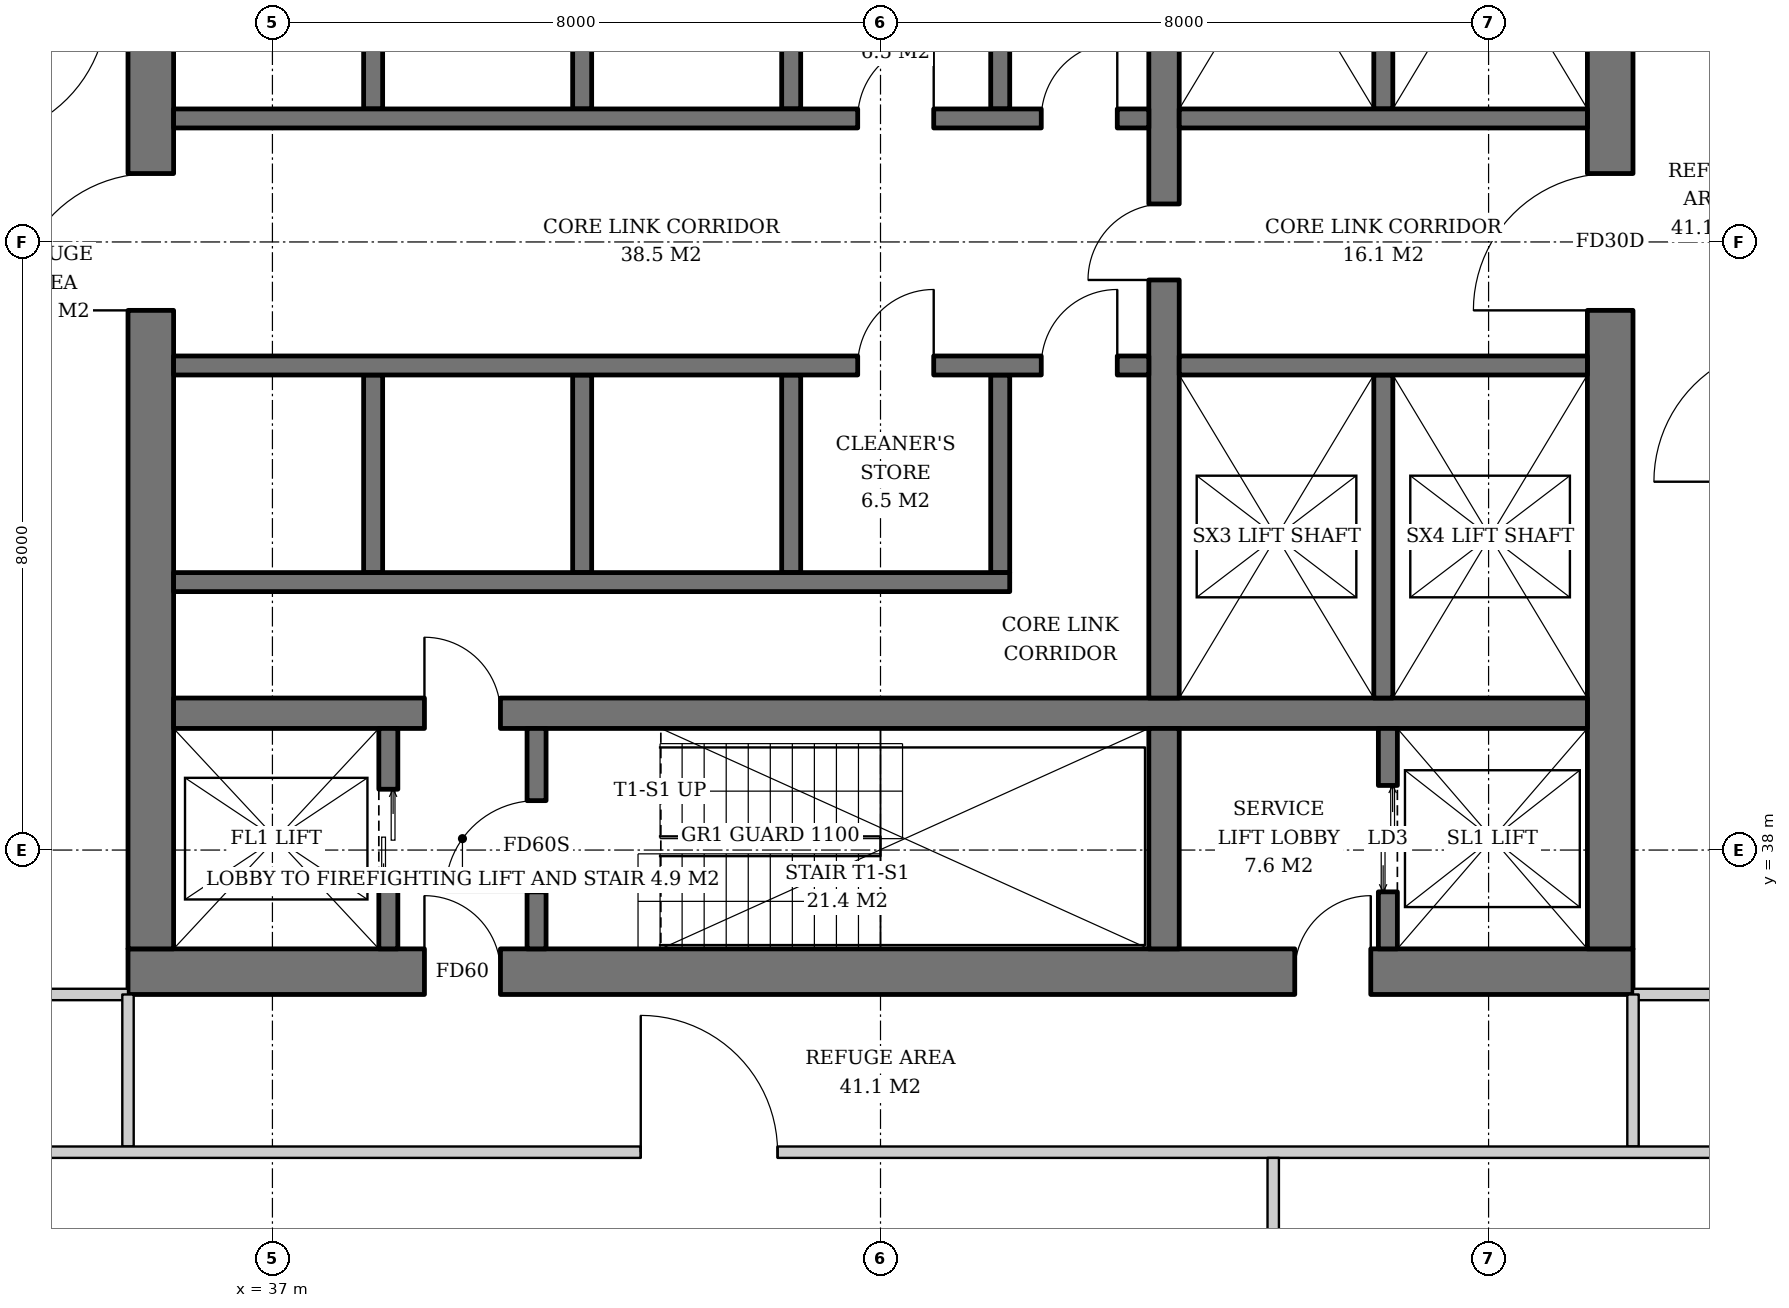
"""IFC4 building model, lengths in metres.
Left out: names, types, materials, properties, quantities, classifications, styles, units other than length and angle.
Written with IfcOpenShell. Run it as: python <this file> out.ifc"""

import sys

from ifc_helpers import new_model, si_unit, direction, frame, frame_2d, origin, place, context, subcontext, project, spatial, rectangle, extrude, element, fill, save


model = new_model("IFC4")
c1 = context("Model", 3, precision=1e-05, world=origin(), true_north=direction((0.0, 1.0)))
c2 = subcontext(c1, "Body", "Model", "MODEL_VIEW")
j1 = project(units=[si_unit("LENGTHUNIT", "METRE"), si_unit("PLANEANGLEUNIT", "RADIAN")], contexts=[c1])
p1 = place(None, origin())
s1 = spatial("IfcSite", under=j1, at=p1, CompositionType="ELEMENT")
p2 = place(p1, origin())
s2 = spatial("IfcBuilding", under=s1, at=p2, CompositionType="ELEMENT")
p3 = place(p2, frame((0.0, 0.0, 230.0)))
s3 = spatial("IfcBuildingStorey", under=s2, at=p3, CompositionType="ELEMENT", Elevation=230.0)
p4 = place(p3, frame((35.1, 36.4, 0.0), z_axis=(0.0, 0.0, 1.0), x_axis=(1.0, 0.0, 0.0)))
e1 = element("IfcWall", 1, at=p4, inside=s3, PredefinedType="SHEAR", context=c2, shape_type="SweptSolid", body=[
    extrude(rectangle(XDim=19.8, YDim=0.6, at=frame_2d((9.9, 0.0))), origin(), (0.0, 0.0, 1.0), 3.8),
])
p5 = place(p4, frame((3.9, 0.0, 0.0)))
e2 = element("IfcOpeningElement", 2, at=p5, cuts=e1, PredefinedType="OPENING", context=c2, shape_type="SweptSolid", body=[
    extrude(rectangle(XDim=1.0, YDim=2.1, at=frame_2d((0.5, 1.05))), frame((0.0, 0.31, 0.0), z_axis=(0.0, -1.0, 0.0), x_axis=(1.0, 0.0, 0.0)), (0.0, 0.0, 1.0), 0.62),
])
p6 = place(p4, frame((15.35, 0.0, 0.0)))
e3 = element("IfcOpeningElement", 3, at=p6, cuts=e1, PredefinedType="OPENING", context=c2, shape_type="SweptSolid", body=[
    extrude(rectangle(XDim=1.0, YDim=2.1, at=frame_2d((0.5, 1.05))), frame((0.0, 0.31, 0.0), z_axis=(0.0, -1.0, 0.0), x_axis=(1.0, 0.0, 0.0)), (0.0, 0.0, 1.0), 0.62),
])
p7 = place(p3, frame((35.4, 36.7, 0.0), z_axis=(0.0, 0.0, 1.0), x_axis=(0.0, 1.0, 0.0)))
e4 = element("IfcWall", 4, at=p7, inside=s3, PredefinedType="SHEAR", context=c2, shape_type="SweptSolid", body=[
    extrude(rectangle(XDim=18.6, YDim=0.6, at=frame_2d((9.3, 0.0))), origin(), (0.0, 0.0, 1.0), 3.8),
])
p8 = place(p7, frame((8.4, 0.0, 0.0)))
e5 = element("IfcOpeningElement", 5, at=p8, cuts=e4, PredefinedType="OPENING", context=c2, shape_type="SweptSolid", body=[
    extrude(rectangle(XDim=1.8, YDim=2.4, at=frame_2d((0.9, 1.2))), frame((0.0, 0.31, 0.0), z_axis=(0.0, -1.0, 0.0), x_axis=(1.0, 0.0, 0.0)), (0.0, 0.0, 1.0), 0.62),
])
p9 = place(p3, frame((54.6, 36.7, 0.0), z_axis=(0.0, 0.0, 1.0), x_axis=(0.0, 1.0, 0.0)))
e6 = element("IfcWall", 6, at=p9, inside=s3, PredefinedType="SHEAR", context=c2, shape_type="SweptSolid", body=[
    extrude(rectangle(XDim=18.6, YDim=0.6, at=frame_2d((9.3, 0.0))), origin(), (0.0, 0.0, 1.0), 3.8),
])
p10 = place(p9, frame((8.4, 0.0, 0.0)))
e7 = element("IfcOpeningElement", 7, at=p10, cuts=e6, PredefinedType="OPENING", context=c2, shape_type="SweptSolid", body=[
    extrude(rectangle(XDim=1.8, YDim=2.4, at=frame_2d((0.9, 1.2))), frame((0.0, 0.31, 0.0), z_axis=(0.0, -1.0, 0.0), x_axis=(1.0, 0.0, 0.0)), (0.0, 0.0, 1.0), 0.62),
])
p11 = place(p3, frame((35.7, 39.8, 0.0), z_axis=(0.0, 0.0, 1.0), x_axis=(1.0, 0.0, 0.0)))
e8 = element("IfcWall", 8, at=p11, inside=s3, PredefinedType="SHEAR", context=c2, shape_type="SweptSolid", body=[
    extrude(rectangle(XDim=18.6, YDim=0.4, at=frame_2d((9.3, 0.0))), origin(), (0.0, 0.0, 1.0), 3.8),
])
p12 = place(p11, frame((3.3, 0.0, 0.0)))
e9 = element("IfcOpeningElement", 9, at=p12, cuts=e8, PredefinedType="OPENING", context=c2, shape_type="SweptSolid", body=[
    extrude(rectangle(XDim=1.0, YDim=2.1, at=frame_2d((0.5, 1.05))), frame((0.0, 0.21, 0.0), z_axis=(0.0, -1.0, 0.0), x_axis=(1.0, 0.0, 0.0)), (0.0, 0.0, 1.0), 0.42),
])
p13 = place(p3, frame((48.73, 36.7, 0.0), z_axis=(0.0, 0.0, 1.0), x_axis=(0.0, 1.0, 0.0)))
e10 = element("IfcWall", 10, at=p13, inside=s3, PredefinedType="SHEAR", context=c2, shape_type="SweptSolid", body=[
    extrude(rectangle(XDim=2.9, YDim=0.4, at=frame_2d((1.45, 0.0))), origin(), (0.0, 0.0, 1.0), 3.8),
])
p14 = place(p3, frame((48.73, 40.0, 0.0), z_axis=(0.0, 0.0, 1.0), x_axis=(0.0, 1.0, 0.0)))
e11 = element("IfcWall", 11, at=p14, inside=s3, PredefinedType="SHEAR", context=c2, shape_type="SweptSolid", body=[
    extrude(rectangle(XDim=12.0, YDim=0.4, at=frame_2d((6.0, 0.0))), origin(), (0.0, 0.0, 1.0), 3.8),
])
p15 = place(p14, frame((5.5, 0.0, 0.0)))
e12 = element("IfcOpeningElement", 12, at=p15, cuts=e11, PredefinedType="OPENING", context=c2, shape_type="SweptSolid", body=[
    extrude(rectangle(XDim=1.0, YDim=2.1, at=frame_2d((0.5, 1.05))), frame((0.0, 0.21, 0.0), z_axis=(0.0, -1.0, 0.0), x_axis=(1.0, 0.0, 0.0)), (0.0, 0.0, 1.0), 0.42),
])
p16 = place(p3, frame((38.525, 36.7, 0.0), z_axis=(0.0, 0.0, 1.0), x_axis=(0.0, 1.0, 0.0)))
e13 = element("IfcWall", 13, at=p16, inside=s3, PredefinedType="SHEAR", context=c2, shape_type="SweptSolid", body=[
    extrude(rectangle(XDim=2.9, YDim=0.25, at=frame_2d((1.45, 0.0))), origin(), (0.0, 0.0, 1.0), 3.8),
])
p17 = place(p16, frame((0.8, 0.0, 0.0)))
e14 = element("IfcOpeningElement", 14, at=p17, cuts=e13, PredefinedType="OPENING", context=c2, shape_type="SweptSolid", body=[
    extrude(rectangle(XDim=1.3, YDim=2.2, at=frame_2d((0.65, 1.1))), frame((0.0, 0.135, 0.0), z_axis=(0.0, -1.0, 0.0), x_axis=(1.0, 0.0, 0.0)), (0.0, 0.0, 1.0), 0.27),
])
p18 = place(p3, frame((40.475, 36.7, 0.0), z_axis=(0.0, 0.0, 1.0), x_axis=(0.0, 1.0, 0.0)))
e15 = element("IfcWall", 15, at=p18, inside=s3, PredefinedType="SHEAR", context=c2, shape_type="SweptSolid", body=[
    extrude(rectangle(XDim=2.9, YDim=0.25, at=frame_2d((1.45, 0.0))), origin(), (0.0, 0.0, 1.0), 3.8),
])
p19 = place(p18, frame((0.75, 0.0, 0.0)))
e16 = element("IfcOpeningElement", 16, at=p19, cuts=e15, PredefinedType="OPENING", context=c2, shape_type="SweptSolid", body=[
    extrude(rectangle(XDim=1.2, YDim=2.1, at=frame_2d((0.6, 1.05))), frame((0.0, 0.135, 0.0), z_axis=(0.0, -1.0, 0.0), x_axis=(1.0, 0.0, 0.0)), (0.0, 0.0, 1.0), 0.27),
])
p20 = place(p3, frame((51.675, 36.7, 0.0), z_axis=(0.0, 0.0, 1.0), x_axis=(0.0, 1.0, 0.0)))
e17 = element("IfcWall", 17, at=p20, inside=s3, PredefinedType="SHEAR", context=c2, shape_type="SweptSolid", body=[
    extrude(rectangle(XDim=2.9, YDim=0.25, at=frame_2d((1.45, 0.0))), origin(), (0.0, 0.0, 1.0), 3.8),
])
p21 = place(p20, frame((0.75, 0.0, 0.0)))
e18 = element("IfcOpeningElement", 18, at=p21, cuts=e17, PredefinedType="OPENING", context=c2, shape_type="SweptSolid", body=[
    extrude(rectangle(XDim=1.4, YDim=2.4, at=frame_2d((0.7, 1.2))), frame((0.0, 0.135, 0.0), z_axis=(0.0, -1.0, 0.0), x_axis=(1.0, 0.0, 0.0)), (0.0, 0.0, 1.0), 0.27),
])
for number, where, z_axis, x_axis in (
    (19, (38.325, 47.75, 0.0), (0.0, 0.0, 1.0), (0.0, 1.0, 0.0)),
    (20, (41.075, 47.75, 0.0), (0.0, 0.0, 1.0), (0.0, 1.0, 0.0)),
    (21, (43.825, 47.75, 0.0), (0.0, 0.0, 1.0), (0.0, 1.0, 0.0)),
    (22, (46.575, 47.75, 0.0), (0.0, 0.0, 1.0), (0.0, 1.0, 0.0)),
):
    element("IfcWall", number, at=place(p3, frame(where, z_axis=z_axis, x_axis=x_axis)), inside=s3, PredefinedType="SHEAR", context=c2, shape_type="SweptSolid", body=[
        extrude(rectangle(XDim=2.6, YDim=0.25, at=frame_2d((1.3, 0.0))), origin(), (0.0, 0.0, 1.0), 3.8),
    ])
p22 = place(p3, frame((35.7, 47.625, 0.0), z_axis=(0.0, 0.0, 1.0), x_axis=(1.0, 0.0, 0.0)))
e23 = element("IfcWall", 23, at=p22, inside=s3, PredefinedType="SHEAR", context=c2, shape_type="SweptSolid", body=[
    extrude(rectangle(XDim=12.83, YDim=0.25, at=frame_2d((6.415, 0.0))), origin(), (0.0, 0.0, 1.0), 3.8),
])
p23 = place(p22, frame((9.0, 0.0, 0.0)))
e24 = element("IfcOpeningElement", 24, at=p23, cuts=e23, PredefinedType="OPENING", context=c2, shape_type="SweptSolid", body=[
    extrude(rectangle(XDim=1.0, YDim=2.1, at=frame_2d((0.5, 1.05))), frame((0.0, 0.135, 0.0), z_axis=(0.0, -1.0, 0.0), x_axis=(1.0, 0.0, 0.0)), (0.0, 0.0, 1.0), 0.27),
])
p24 = place(p22, frame((11.415, 0.0, 0.0)))
e25 = element("IfcOpeningElement", 25, at=p24, cuts=e23, PredefinedType="OPENING", context=c2, shape_type="SweptSolid", body=[
    extrude(rectangle(XDim=1.0, YDim=2.1, at=frame_2d((0.5, 1.05))), frame((0.0, 0.135, 0.0), z_axis=(0.0, -1.0, 0.0), x_axis=(1.0, 0.0, 0.0)), (0.0, 0.0, 1.0), 0.27),
])
for number, where, z_axis, x_axis in (
    (26, (38.325, 44.25, 0.0), (0.0, 0.0, 1.0), (0.0, -1.0, 0.0)),
    (27, (41.075, 44.25, 0.0), (0.0, 0.0, 1.0), (0.0, -1.0, 0.0)),
    (28, (43.825, 44.25, 0.0), (0.0, 0.0, 1.0), (0.0, -1.0, 0.0)),
    (29, (46.575, 44.25, 0.0), (0.0, 0.0, 1.0), (0.0, -1.0, 0.0)),
):
    element("IfcWall", number, at=place(p3, frame(where, z_axis=z_axis, x_axis=x_axis)), inside=s3, PredefinedType="SHEAR", context=c2, shape_type="SweptSolid", body=[
        extrude(rectangle(XDim=2.6, YDim=0.25, at=frame_2d((1.3, 0.0))), origin(), (0.0, 0.0, 1.0), 3.8),
    ])
p25 = place(p3, frame((35.7, 41.525, 0.0), z_axis=(0.0, 0.0, 1.0), x_axis=(1.0, 0.0, 0.0)))
e30 = element("IfcWall", 30, at=p25, inside=s3, PredefinedType="SHEAR", context=c2, shape_type="SweptSolid", body=[
    extrude(rectangle(XDim=11.0, YDim=0.25, at=frame_2d((5.5, 0.0))), origin(), (0.0, 0.0, 1.0), 3.8),
])
p26 = place(p3, frame((35.7, 44.375, 0.0), z_axis=(0.0, 0.0, 1.0), x_axis=(1.0, 0.0, 0.0)))
e31 = element("IfcWall", 31, at=p26, inside=s3, PredefinedType="SHEAR", context=c2, shape_type="SweptSolid", body=[
    extrude(rectangle(XDim=12.83, YDim=0.25, at=frame_2d((6.415, 0.0))), origin(), (0.0, 0.0, 1.0), 3.8),
])
p27 = place(p26, frame((9.0, 0.0, 0.0)))
e32 = element("IfcOpeningElement", 32, at=p27, cuts=e31, PredefinedType="OPENING", context=c2, shape_type="SweptSolid", body=[
    extrude(rectangle(XDim=1.0, YDim=2.1, at=frame_2d((0.5, 1.05))), frame((0.0, 0.135, 0.0), z_axis=(0.0, -1.0, 0.0), x_axis=(1.0, 0.0, 0.0)), (0.0, 0.0, 1.0), 0.27),
])
p28 = place(p26, frame((11.415, 0.0, 0.0)))
e33 = element("IfcOpeningElement", 33, at=p28, cuts=e31, PredefinedType="OPENING", context=c2, shape_type="SweptSolid", body=[
    extrude(rectangle(XDim=1.0, YDim=2.1, at=frame_2d((0.5, 1.05))), frame((0.0, 0.135, 0.0), z_axis=(0.0, -1.0, 0.0), x_axis=(1.0, 0.0, 0.0)), (0.0, 0.0, 1.0), 0.27),
])
p29 = place(p3, frame((51.615, 47.75, 0.0), z_axis=(0.0, 0.0, 1.0), x_axis=(0.0, 1.0, 0.0)))
e34 = element("IfcWall", 34, at=p29, inside=s3, PredefinedType="SHEAR", context=c2, shape_type="SweptSolid", body=[
    extrude(rectangle(XDim=4.25, YDim=0.25, at=frame_2d((2.125, 0.0))), origin(), (0.0, 0.0, 1.0), 3.8),
])
p30 = place(p3, frame((48.93, 47.625, 0.0), z_axis=(0.0, 0.0, 1.0), x_axis=(1.0, 0.0, 0.0)))
e35 = element("IfcWall", 35, at=p30, inside=s3, PredefinedType="SHEAR", context=c2, shape_type="SweptSolid", body=[
    extrude(rectangle(XDim=5.37, YDim=0.25, at=frame_2d((2.685, 0.0))), origin(), (0.0, 0.0, 1.0), 3.8),
])
p31 = place(p3, frame((51.615, 44.25, 0.0), z_axis=(0.0, 0.0, 1.0), x_axis=(0.0, -1.0, 0.0)))
e36 = element("IfcWall", 36, at=p31, inside=s3, PredefinedType="SHEAR", context=c2, shape_type="SweptSolid", body=[
    extrude(rectangle(XDim=4.25, YDim=0.25, at=frame_2d((2.125, 0.0))), origin(), (0.0, 0.0, 1.0), 3.8),
])
p32 = place(p3, frame((48.93, 44.375, 0.0), z_axis=(0.0, 0.0, 1.0), x_axis=(1.0, 0.0, 0.0)))
e37 = element("IfcWall", 37, at=p32, inside=s3, PredefinedType="SHEAR", context=c2, shape_type="SweptSolid", body=[
    extrude(rectangle(XDim=5.37, YDim=0.25, at=frame_2d((2.685, 0.0))), origin(), (0.0, 0.0, 1.0), 3.8),
])
for number, where, z_axis, x_axis in (
    (38, (54.9, 36.1, 0.0), (0.0, 0.0, 1.0), (1.0, 0.0, 0.0)),
    (39, (35.1, 36.1, 0.0), (0.0, 0.0, 1.0), (-1.0, 0.0, 0.0)),
    (40, (54.9, 36.1, 0.0), (0.0, 0.0, 1.0), (0.0, -1.0, 0.0)),
    (41, (35.1, 36.1, 0.0), (0.0, 0.0, 1.0), (0.0, -1.0, 0.0)),
):
    element("IfcWall", number, at=place(p3, frame(where, z_axis=z_axis, x_axis=x_axis)), inside=s3, PredefinedType="PARTITIONING", context=c2, shape_type="SweptSolid", body=[
        extrude(rectangle(XDim=2.0, YDim=0.15, at=frame_2d((1.0, 0.0))), origin(), (0.0, 0.0, 1.0), 3.6),
    ])
p33 = place(p3, frame((32.264, 34.025, 0.0), z_axis=(0.0, 0.0, 1.0), x_axis=(1.0, 0.0, 0.0)))
e42 = element("IfcWall", 42, at=p33, inside=s3, PredefinedType="PARTITIONING", context=c2, shape_type="SweptSolid", body=[
    extrude(rectangle(XDim=24.636, YDim=0.15, at=frame_2d((12.318, 0.0))), origin(), (0.0, 0.0, 1.0), 3.0),
])
p34 = place(p33, frame((9.582, 0.0, 0.0)))
e43 = element("IfcOpeningElement", 43, at=p34, cuts=e42, PredefinedType="OPENING", context=c2, shape_type="SweptSolid", body=[
    extrude(rectangle(XDim=1.8, YDim=2.4, at=frame_2d((0.9, 1.2))), frame((0.0, 0.085, 0.0), z_axis=(0.0, -1.0, 0.0), x_axis=(1.0, 0.0, 0.0)), (0.0, 0.0, 1.0), 0.17),
])
p35 = place(p3, frame((50.167, 33.95, 0.0), z_axis=(0.0, 0.0, 1.0), x_axis=(0.0, -1.0, 0.0)))
e44 = element("IfcWall", 44, at=p35, inside=s3, PredefinedType="PARTITIONING", context=c2, shape_type="SweptSolid", body=[
    extrude(rectangle(XDim=4.584, YDim=0.15, at=frame_2d((2.292, 0.0))), origin(), (0.0, 0.0, 1.0), 3.6),
])
p36 = place(p17, origin())
e45 = element("IfcDoor", 45, at=p36, inside=s3, OperationType="DOUBLE_DOOR_SLIDING", PredefinedType="DOOR", context=c2, shape_type="SweptSolid", body=[
    extrude(rectangle(XDim=1.3, YDim=2.2, at=frame_2d((0.65, 1.1))), frame((0.0, 0.025, 0.0), z_axis=(0.0, -1.0, 0.0), x_axis=(1.0, 0.0, 0.0)), (0.0, 0.0, 1.0), 0.05),
])
fill(e14, e45)
p37 = place(p19, origin())
e46 = element("IfcDoor", 46, at=p37, inside=s3, OperationType="SINGLE_SWING_LEFT", PredefinedType="DOOR", context=c2, shape_type="SweptSolid", body=[
    extrude(rectangle(XDim=1.2, YDim=2.1, at=frame_2d((0.6, 1.05))), frame((0.0, 0.025, 0.0), z_axis=(0.0, -1.0, 0.0), x_axis=(1.0, 0.0, 0.0)), (0.0, 0.0, 1.0), 0.05),
])
fill(e16, e46)
p38 = place(p21, origin())
e47 = element("IfcDoor", 47, at=p38, inside=s3, OperationType="DOUBLE_DOOR_SLIDING", PredefinedType="DOOR", context=c2, shape_type="SweptSolid", body=[
    extrude(rectangle(XDim=1.4, YDim=2.4, at=frame_2d((0.7, 1.2))), frame((0.0, 0.025, 0.0), z_axis=(0.0, -1.0, 0.0), x_axis=(1.0, 0.0, 0.0)), (0.0, 0.0, 1.0), 0.05),
])
fill(e18, e47)
p39 = place(p23, origin())
e48 = element("IfcDoor", 48, at=p39, inside=s3, OperationType="SINGLE_SWING_RIGHT", PredefinedType="DOOR", context=c2, shape_type="SweptSolid", body=[
    extrude(rectangle(XDim=1.0, YDim=2.1, at=frame_2d((0.5, 1.05))), frame((0.0, 0.025, 0.0), z_axis=(0.0, -1.0, 0.0), x_axis=(1.0, 0.0, 0.0)), (0.0, 0.0, 1.0), 0.05),
])
fill(e24, e48)
p40 = place(p24, origin())
e49 = element("IfcDoor", 49, at=p40, inside=s3, OperationType="SINGLE_SWING_RIGHT", PredefinedType="DOOR", context=c2, shape_type="SweptSolid", body=[
    extrude(rectangle(XDim=1.0, YDim=2.1, at=frame_2d((0.5, 1.05))), frame((0.0, 0.025, 0.0), z_axis=(0.0, -1.0, 0.0), x_axis=(1.0, 0.0, 0.0)), (0.0, 0.0, 1.0), 0.05),
])
fill(e25, e49)
p41 = place(p27, origin())
e50 = element("IfcDoor", 50, at=p41, inside=s3, OperationType="SINGLE_SWING_RIGHT", PredefinedType="DOOR", context=c2, shape_type="SweptSolid", body=[
    extrude(rectangle(XDim=1.0, YDim=2.1, at=frame_2d((0.5, 1.05))), frame((0.0, 0.025, 0.0), z_axis=(0.0, -1.0, 0.0), x_axis=(1.0, 0.0, 0.0)), (0.0, 0.0, 1.0), 0.05),
])
fill(e32, e50)
p42 = place(p28, origin())
e51 = element("IfcDoor", 51, at=p42, inside=s3, OperationType="SINGLE_SWING_RIGHT", PredefinedType="DOOR", context=c2, shape_type="SweptSolid", body=[
    extrude(rectangle(XDim=1.0, YDim=2.1, at=frame_2d((0.5, 1.05))), frame((0.0, 0.025, 0.0), z_axis=(0.0, -1.0, 0.0), x_axis=(1.0, 0.0, 0.0)), (0.0, 0.0, 1.0), 0.05),
])
fill(e33, e51)
p43 = place(p15, origin())
e52 = element("IfcDoor", 52, at=p43, inside=s3, OperationType="SINGLE_SWING_LEFT", PredefinedType="DOOR", context=c2, shape_type="SweptSolid", body=[
    extrude(rectangle(XDim=1.0, YDim=2.1, at=frame_2d((0.5, 1.05))), frame((0.0, 0.025, 0.0), z_axis=(0.0, -1.0, 0.0), x_axis=(1.0, 0.0, 0.0)), (0.0, 0.0, 1.0), 0.05),
])
fill(e12, e52)
p44 = place(p5, origin())
e53 = element("IfcDoor", 53, at=p44, inside=s3, OperationType="SINGLE_SWING_LEFT", PredefinedType="DOOR", context=c2, shape_type="SweptSolid", body=[
    extrude(rectangle(XDim=1.0, YDim=2.1, at=frame_2d((0.5, 1.05))), frame((0.0, 0.025, 0.0), z_axis=(0.0, -1.0, 0.0), x_axis=(1.0, 0.0, 0.0)), (0.0, 0.0, 1.0), 0.05),
])
fill(e2, e53)
p45 = place(p8, origin())
e54 = element("IfcDoor", 54, at=p45, inside=s3, OperationType="DOUBLE_DOOR_SINGLE_SWING", PredefinedType="DOOR", context=c2, shape_type="SweptSolid", body=[
    extrude(rectangle(XDim=1.8, YDim=2.4, at=frame_2d((0.9, 1.2))), frame((0.0, 0.025, 0.0), z_axis=(0.0, -1.0, 0.0), x_axis=(1.0, 0.0, 0.0)), (0.0, 0.0, 1.0), 0.05),
])
fill(e5, e54)
p46 = place(p10, origin())
e55 = element("IfcDoor", 55, at=p46, inside=s3, OperationType="DOUBLE_DOOR_SINGLE_SWING", PredefinedType="DOOR", context=c2, shape_type="SweptSolid", body=[
    extrude(rectangle(XDim=1.8, YDim=2.4, at=frame_2d((0.9, 1.2))), frame((0.0, 0.025, 0.0), z_axis=(0.0, -1.0, 0.0), x_axis=(1.0, 0.0, 0.0)), (0.0, 0.0, 1.0), 0.05),
])
fill(e7, e55)
p47 = place(p6, origin())
e56 = element("IfcDoor", 56, at=p47, inside=s3, OperationType="SINGLE_SWING_RIGHT", PredefinedType="DOOR", context=c2, shape_type="SweptSolid", body=[
    extrude(rectangle(XDim=1.0, YDim=2.1, at=frame_2d((0.5, 1.05))), frame((0.0, 0.025, 0.0), z_axis=(0.0, -1.0, 0.0), x_axis=(1.0, 0.0, 0.0)), (0.0, 0.0, 1.0), 0.05),
])
fill(e3, e56)
p48 = place(p12, origin())
e57 = element("IfcDoor", 57, at=p48, inside=s3, OperationType="SINGLE_SWING_LEFT", PredefinedType="DOOR", context=c2, shape_type="SweptSolid", body=[
    extrude(rectangle(XDim=1.0, YDim=2.1, at=frame_2d((0.5, 1.05))), frame((0.0, 0.025, 0.0), z_axis=(0.0, -1.0, 0.0), x_axis=(1.0, 0.0, 0.0)), (0.0, 0.0, 1.0), 0.05),
])
fill(e9, e57)
p49 = place(p34, origin())
e58 = element("IfcDoor", 58, at=p49, inside=s3, OperationType="DOUBLE_DOOR_SINGLE_SWING", PredefinedType="DOOR", context=c2, shape_type="SweptSolid", body=[
    extrude(rectangle(XDim=1.8, YDim=2.4, at=frame_2d((0.9, 1.2))), frame((0.0, 0.025, 0.0), z_axis=(0.0, -1.0, 0.0), x_axis=(1.0, 0.0, 0.0)), (0.0, 0.0, 1.0), 0.05),
])
fill(e43, e58)
save(model, sys.argv[1])
